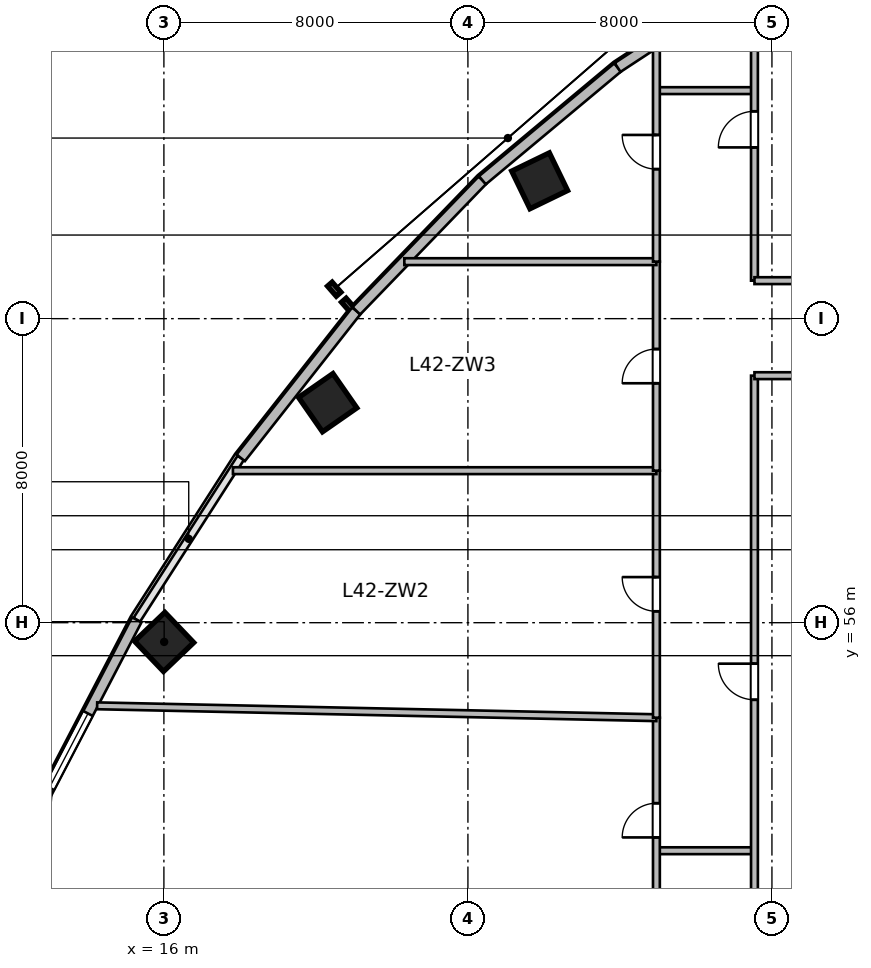
"""IFC4 building model, lengths in metres.
Left out: names, types, materials, properties, quantities, classifications, styles, units other than length and angle.
Written with IfcOpenShell. Run it as: python <this file> out.ifc"""

import sys

from ifc_helpers import new_model, si_unit, direction, frame, frame_2d, origin, origin_2d, place, context, subcontext, project, spatial, rectangle, extrude, source, transform, mapped, element, fill, save


model = new_model("IFC4")
c1 = context("Model", 3, precision=1e-05, world=origin(), true_north=direction((0.0, 1.0)))
c2 = subcontext(c1, "Body", "Model", "MODEL_VIEW")
j1 = project(units=[si_unit("LENGTHUNIT", "METRE"), si_unit("PLANEANGLEUNIT", "RADIAN")], contexts=[c1])
p1 = place(None, origin())
s1 = spatial("IfcSite", under=j1, at=p1, CompositionType="ELEMENT")
p2 = place(p1, origin())
s2 = spatial("IfcBuilding", under=s1, at=p2, CompositionType="ELEMENT")
p3 = place(p2, frame((0.0, 0.0, 174.0)))
s3 = spatial("IfcBuildingStorey", under=s2, at=p3, CompositionType="ELEMENT", Elevation=174.0)
m1 = source(origin(), c2, "Body", "SweptSolid", [
    extrude(rectangle(XDim=1.1, YDim=1.1, at=origin_2d()), origin(), (0.0, 0.0, 1.0), 3.9),
])
for number, where, z_axis, x_axis in (
    (1, (16.007, 55.494, 0.0), (0.0, 0.0, 1.0), (-0.691, 0.723, 0.0)),
    (2, (20.311, 61.789, 0.0), (0.0, 0.0, 1.0), (-0.571, 0.821, 0.0)),
    (3, (25.888, 67.627, 0.0), (0.0, 0.0, 1.0), (-0.436, 0.9, 0.0)),
):
    element("IfcColumn", number, at=place(p3, frame(where, z_axis=z_axis, x_axis=x_axis)), inside=s3, PredefinedType="COLUMN", context=c2, shape_type="MappedRepresentation", body=[
        mapped(m1, transform((0.0, 0.0, 0.0), scale=1.0)),
    ])
m2 = source(origin(), c2, "Body", "SweptSolid", [
    extrude(rectangle(XDim=2.812, YDim=0.28, at=frame_2d((1.406, 0.0))), origin(), (0.0, 0.0, 1.0), 3.65),
])
p4 = place(p3, frame((33.945, 48.973, 0.0), z_axis=(0.0, 0.0, 1.0), x_axis=(-0.694583668785, -0.719411931411, 0.0)))
e4 = element("IfcWall", 4, at=p4, inside=s3, PredefinedType="SOLIDWALL", context=c2, shape_type="MappedRepresentation", body=[
    mapped(m2, transform((0.0, 0.0, 0.0), scale=1.0)),
])
m3 = source(origin(), c2, "Body", "SweptSolid", [
    extrude(rectangle(XDim=5.171, YDim=0.28, at=frame_2d((2.585, 0.0))), origin(), (0.0, 0.0, 1.0), 3.65),
])
p5 = place(p3, frame((12.898, 51.489, 0.0), z_axis=(0.0, 0.0, 1.0), x_axis=(0.461752581363, 0.887008767491, 0.0)))
e5 = element("IfcWall", 5, at=p5, inside=s3, PredefinedType="SOLIDWALL", context=c2, shape_type="MappedRepresentation", body=[
    mapped(m3, transform((0.0, 0.0, 0.0), scale=1.0)),
])
p6 = place(p5, frame((0.193, 0.0, 0.95)))
e6 = element("IfcOpeningElement", 6, at=p6, cuts=e5, PredefinedType="OPENING", context=c2, shape_type="SweptSolid", body=[
    extrude(rectangle(XDim=2.2, YDim=2.1, at=frame_2d((1.1, 1.05))), frame((0.0, 0.15, 0.0), z_axis=(0.0, -1.0, 0.0), x_axis=(1.0, 0.0, 0.0)), (0.0, 0.0, 1.0), 0.3),
])
m4 = source(origin(), c2, "Body", "SweptSolid", [
    extrude(rectangle(XDim=4.922, YDim=0.28, at=frame_2d((2.461, 0.0))), origin(), (0.0, 0.0, 1.0), 3.65),
])
p7 = place(p3, frame((18.021, 60.338, 0.0), z_axis=(0.0, 0.0, 1.0), x_axis=(0.61817639101, 0.786039407153, 0.0)))
e7 = element("IfcWall", 7, at=p7, inside=s3, PredefinedType="SOLIDWALL", context=c2, shape_type="MappedRepresentation", body=[
    mapped(m4, transform((0.0, 0.0, 0.0), scale=1.0)),
])
m5 = source(origin(), c2, "Body", "SweptSolid", [
    extrude(rectangle(XDim=4.776, YDim=0.28, at=frame_2d((2.388, 0.0))), origin(), (0.0, 0.0, 1.0), 3.65),
])
p8 = place(p3, frame((21.064, 64.206, 0.0), z_axis=(0.0, 0.0, 1.0), x_axis=(0.694601811851, 0.719394414055, 0.0)))
e8 = element("IfcWall", 8, at=p8, inside=s3, PredefinedType="SOLIDWALL", context=c2, shape_type="MappedRepresentation", body=[
    mapped(m5, transform((0.0, 0.0, 0.0), scale=1.0)),
])
m6 = source(origin(), c2, "Body", "SweptSolid", [
    extrude(rectangle(XDim=4.634, YDim=0.28, at=frame_2d((2.317, 0.0))), origin(), (0.0, 0.0, 1.0), 3.65),
])
p9 = place(p3, frame((24.381, 67.642, 0.0), z_axis=(0.0, 0.0, 1.0), x_axis=(0.767910229096, 0.640557475993, 0.0)))
e9 = element("IfcWall", 9, at=p9, inside=s3, PredefinedType="SOLIDWALL", context=c2, shape_type="MappedRepresentation", body=[
    mapped(m6, transform((0.0, 0.0, 0.0), scale=1.0)),
])
m7 = source(origin(), c2, "Body", "SweptSolid", [
    extrude(rectangle(XDim=4.501, YDim=0.28, at=frame_2d((2.25, 0.0))), origin(), (0.0, 0.0, 1.0), 3.65),
])
p10 = place(p3, frame((27.939, 70.61, 0.0), z_axis=(0.0, 0.0, 1.0), x_axis=(0.835984920737, 0.548752414391, 0.0)))
e10 = element("IfcWall", 10, at=p10, inside=s3, PredefinedType="SOLIDWALL", context=c2, shape_type="MappedRepresentation", body=[
    mapped(m7, transform((0.0, 0.0, 0.0), scale=1.0)),
])
m8 = source(origin(), c2, "Body", "SweptSolid", [
    extrude(rectangle(XDim=2.5, YDim=0.18, at=frame_2d((1.25, 0.0))), origin(), (0.0, 0.0, 1.0), 3.65),
])
p11 = place(p3, frame((29.0, 50.0, 0.0), z_axis=(0.0, 0.0, 1.0), x_axis=(1.0, 0.0, 0.0)))
e11 = element("IfcWall", 11, at=p11, inside=s3, PredefinedType="PLUMBINGWALL", context=c2, shape_type="MappedRepresentation", body=[
    mapped(m8, transform((0.0, 0.0, 0.0), scale=1.0)),
])
m9 = source(origin(), c2, "Body", "SweptSolid", [
    extrude(rectangle(XDim=2.5, YDim=0.18, at=frame_2d((1.25, 0.0))), origin(), (0.0, 0.0, 1.0), 3.022),
])
p12 = place(p3, frame((29.0, 70.0, 0.0), z_axis=(0.0, 0.0, 1.0), x_axis=(1.0, 0.0, 0.0)))
e12 = element("IfcWall", 12, at=p12, inside=s3, PredefinedType="PLUMBINGWALL", context=c2, shape_type="MappedRepresentation", body=[
    mapped(m9, transform((0.0, 0.0, 0.0), scale=1.0)),
])
m10 = source(origin(), c2, "Body", "SweptSolid", [
    extrude(rectangle(XDim=10.735, YDim=0.18, at=frame_2d((5.368, 0.0))), origin(), (0.0, 0.0, 1.0), 2.942),
])
p13 = place(p3, frame((28.96, 42.765, 0.0), z_axis=(0.0, 0.0, 1.0), x_axis=(0.0, 1.0, 0.0)))
e13 = element("IfcWall", 13, at=p13, inside=s3, PredefinedType="PLUMBINGWALL", context=c2, shape_type="MappedRepresentation", body=[
    mapped(m10, transform((0.0, 0.0, 0.0), scale=1.0)),
])
p14 = place(p13, frame((7.585, 0.0, 0.0)))
e14 = element("IfcOpeningElement", 14, at=p14, cuts=e13, PredefinedType="OPENING", context=c2, shape_type="SweptSolid", body=[
    extrude(rectangle(XDim=0.9, YDim=2.08, at=frame_2d((0.45, 1.04))), frame((0.0, 0.1, 0.0), z_axis=(0.0, -1.0, 0.0), x_axis=(1.0, 0.0, 0.0)), (0.0, 0.0, 1.0), 0.2),
])
m11 = source(origin(), c2, "Body", "SweptSolid", [
    extrude(rectangle(XDim=14.72, YDim=0.18, at=frame_2d((7.36, 0.0))), origin(), (0.0, 0.0, 1.0), 3.65),
])
p15 = place(p3, frame((14.243, 53.813, 0.0), z_axis=(0.0, 0.0, 1.0), x_axis=(0.999773932637, -0.021262258118, 0.0)))
e15 = element("IfcWall", 15, at=p15, inside=s3, PredefinedType="PLUMBINGWALL", context=c2, shape_type="MappedRepresentation", body=[
    mapped(m11, transform((0.0, 0.0, 0.0), scale=1.0)),
])
m12 = source(origin(), c2, "Body", "SweptSolid", [
    extrude(rectangle(XDim=6.5, YDim=0.18, at=frame_2d((3.25, 0.0))), origin(), (0.0, 0.0, 1.0), 3.081),
])
p16 = place(p3, frame((28.96, 53.5, 0.0), z_axis=(0.0, 0.0, 1.0), x_axis=(0.0, 1.0, 0.0)))
e16 = element("IfcWall", 16, at=p16, inside=s3, PredefinedType="PLUMBINGWALL", context=c2, shape_type="MappedRepresentation", body=[
    mapped(m12, transform((0.0, 0.0, 0.0), scale=1.0)),
])
p17 = place(p16, frame((2.8, 0.0, 0.0)))
e17 = element("IfcOpeningElement", 17, at=p17, cuts=e16, PredefinedType="OPENING", context=c2, shape_type="SweptSolid", body=[
    extrude(rectangle(XDim=0.9, YDim=2.08, at=frame_2d((0.45, 1.04))), frame((0.0, 0.1, 0.0), z_axis=(0.0, -1.0, 0.0), x_axis=(1.0, 0.0, 0.0)), (0.0, 0.0, 1.0), 0.2),
])
m13 = source(origin(), c2, "Body", "SweptSolid", [
    extrude(rectangle(XDim=11.144, YDim=0.18, at=frame_2d((5.572, 0.0))), origin(), (0.0, 0.0, 1.0), 3.65),
])
p18 = place(p3, frame((17.816, 60.0, 0.0), z_axis=(0.0, 0.0, 1.0), x_axis=(1.0, 0.0, 0.0)))
e18 = element("IfcWall", 18, at=p18, inside=s3, PredefinedType="PLUMBINGWALL", context=c2, shape_type="MappedRepresentation", body=[
    mapped(m13, transform((0.0, 0.0, 0.0), scale=1.0)),
])
m14 = source(origin(), c2, "Body", "SweptSolid", [
    extrude(rectangle(XDim=5.5, YDim=0.18, at=frame_2d((2.75, 0.0))), origin(), (0.0, 0.0, 1.0), 2.942),
])
p19 = place(p3, frame((28.96, 60.0, 0.0), z_axis=(0.0, 0.0, 1.0), x_axis=(0.0, 1.0, 0.0)))
e19 = element("IfcWall", 19, at=p19, inside=s3, PredefinedType="PLUMBINGWALL", context=c2, shape_type="MappedRepresentation", body=[
    mapped(m14, transform((0.0, 0.0, 0.0), scale=1.0)),
])
p20 = place(p19, frame((2.3, 0.0, 0.0)))
e20 = element("IfcOpeningElement", 20, at=p20, cuts=e19, PredefinedType="OPENING", context=c2, shape_type="SweptSolid", body=[
    extrude(rectangle(XDim=0.9, YDim=2.08, at=frame_2d((0.45, 1.04))), frame((0.0, 0.1, 0.0), z_axis=(0.0, -1.0, 0.0), x_axis=(1.0, 0.0, 0.0)), (0.0, 0.0, 1.0), 0.2),
])
m15 = source(origin(), c2, "Body", "SweptSolid", [
    extrude(rectangle(XDim=6.633, YDim=0.18, at=frame_2d((3.317, 0.0))), origin(), (0.0, 0.0, 1.0), 3.65),
])
p21 = place(p3, frame((22.327, 65.5, 0.0), z_axis=(0.0, 0.0, 1.0), x_axis=(1.0, 0.0, 0.0)))
e21 = element("IfcWall", 21, at=p21, inside=s3, PredefinedType="PLUMBINGWALL", context=c2, shape_type="MappedRepresentation", body=[
    mapped(m15, transform((0.0, 0.0, 0.0), scale=1.0)),
])
m16 = source(origin(), c2, "Body", "SweptSolid", [
    extrude(rectangle(XDim=5.768, YDim=0.18, at=frame_2d((2.884, 0.0))), origin(), (0.0, 0.0, 1.0), 3.65),
])
p22 = place(p3, frame((28.96, 65.5, 0.0), z_axis=(0.0, 0.0, 1.0), x_axis=(0.0, 1.0, 0.0)))
e22 = element("IfcWall", 22, at=p22, inside=s3, PredefinedType="PLUMBINGWALL", context=c2, shape_type="MappedRepresentation", body=[
    mapped(m16, transform((0.0, 0.0, 0.0), scale=1.0)),
])
p23 = place(p22, frame((2.434, 0.0, 0.0)))
e23 = element("IfcOpeningElement", 23, at=p23, cuts=e22, PredefinedType="OPENING", context=c2, shape_type="SweptSolid", body=[
    extrude(rectangle(XDim=0.9, YDim=2.08, at=frame_2d((0.45, 1.04))), frame((0.0, 0.1, 0.0), z_axis=(0.0, -1.0, 0.0), x_axis=(1.0, 0.0, 0.0)), (0.0, 0.0, 1.0), 0.2),
])
m17 = source(origin(), c2, "Body", "SweptSolid", [
    extrude(rectangle(XDim=16.106, YDim=0.18, at=frame_2d((8.053, 0.0))), origin(), (0.0, 0.0, 1.0), 2.942),
])
p24 = place(p3, frame((31.54, 46.394, 0.0), z_axis=(0.0, 0.0, 1.0), x_axis=(0.0, 1.0, 0.0)))
e24 = element("IfcWall", 24, at=p24, inside=s3, PredefinedType="PLUMBINGWALL", context=c2, shape_type="MappedRepresentation", body=[
    mapped(m17, transform((0.0, 0.0, 0.0), scale=1.0)),
])
p25 = place(p24, frame((7.578, 0.0, 0.0)))
e25 = element("IfcOpeningElement", 25, at=p25, cuts=e24, PredefinedType="OPENING", context=c2, shape_type="SweptSolid", body=[
    extrude(rectangle(XDim=0.95, YDim=2.1, at=frame_2d((0.475, 1.05))), frame((0.0, 0.1, 0.0), z_axis=(0.0, -1.0, 0.0), x_axis=(1.0, 0.0, 0.0)), (0.0, 0.0, 1.0), 0.2),
])
m18 = source(origin(), c2, "Body", "SweptSolid", [
    extrude(rectangle(XDim=2.86, YDim=0.18, at=frame_2d((1.43, 0.0))), origin(), (0.0, 0.0, 1.0), 3.65),
])
p26 = place(p3, frame((31.54, 62.5, 0.0), z_axis=(0.0, 0.0, 1.0), x_axis=(1.0, 0.0, 0.0)))
e26 = element("IfcWall", 26, at=p26, inside=s3, PredefinedType="PLUMBINGWALL", context=c2, shape_type="MappedRepresentation", body=[
    mapped(m18, transform((0.0, 0.0, 0.0), scale=1.0)),
])
m19 = source(origin(), c2, "Body", "SweptSolid", [
    extrude(rectangle(XDim=7.962, YDim=0.18, at=frame_2d((3.981, 0.0))), origin(), (0.0, 0.0, 1.0), 3.65),
])
p27 = place(p3, frame((31.54, 65.0, 0.0), z_axis=(0.0, 0.0, 1.0), x_axis=(0.0, 1.0, 0.0)))
e27 = element("IfcWall", 27, at=p27, inside=s3, PredefinedType="PLUMBINGWALL", context=c2, shape_type="MappedRepresentation", body=[
    mapped(m19, transform((0.0, 0.0, 0.0), scale=1.0)),
])
p28 = place(p27, frame((3.506, 0.0, 0.0)))
e28 = element("IfcOpeningElement", 28, at=p28, cuts=e27, PredefinedType="OPENING", context=c2, shape_type="SweptSolid", body=[
    extrude(rectangle(XDim=0.95, YDim=2.1, at=frame_2d((0.475, 1.05))), frame((0.0, 0.1, 0.0), z_axis=(0.0, -1.0, 0.0), x_axis=(1.0, 0.0, 0.0)), (0.0, 0.0, 1.0), 0.2),
])
p29 = place(p3, frame((31.54, 65.0, 0.0), z_axis=(0.0, 0.0, 1.0), x_axis=(1.0, 0.0, 0.0)))
e29 = element("IfcWall", 29, at=p29, inside=s3, PredefinedType="PLUMBINGWALL", context=c2, shape_type="MappedRepresentation", body=[
    mapped(m18, transform((0.0, 0.0, 0.0), scale=1.0)),
])
m20 = source(origin(), c2, "Body", "SweptSolid", [
    extrude(rectangle(XDim=2.2, YDim=2.1, at=frame_2d((1.1, 1.05))), frame((0.0, 0.03, 0.0), z_axis=(0.0, -1.0, 0.0), x_axis=(1.0, 0.0, 0.0)), (0.0, 0.0, 1.0), 0.06),
])
p30 = place(p6, origin())
e30 = element("IfcWindow", 30, at=p30, inside=s3, PartitioningType="TRIPLE_PANEL_VERTICAL", PredefinedType="WINDOW", context=c2, shape_type="MappedRepresentation", body=[
    mapped(m20, transform((0.0, 0.0, 0.0), scale=1.0)),
])
fill(e6, e30)
m21 = source(origin(), c2, "Body", "SweptSolid", [
    extrude(rectangle(XDim=0.9, YDim=2.08, at=frame_2d((0.45, 1.04))), frame((0.0, 0.025, 0.0), z_axis=(0.0, -1.0, 0.0), x_axis=(1.0, 0.0, 0.0)), (0.0, 0.0, 1.0), 0.05),
])
p31 = place(p14, origin())
e31 = element("IfcDoor", 31, at=p31, inside=s3, OperationType="SINGLE_SWING_LEFT", PredefinedType="DOOR", context=c2, shape_type="MappedRepresentation", body=[
    mapped(m21, transform((0.0, 0.0, 0.0), scale=1.0)),
])
fill(e14, e31)
p32 = place(p17, origin())
e32 = element("IfcDoor", 32, at=p32, inside=s3, OperationType="SINGLE_SWING_RIGHT", PredefinedType="DOOR", context=c2, shape_type="MappedRepresentation", body=[
    mapped(m21, transform((0.0, 0.0, 0.0), scale=1.0)),
])
fill(e17, e32)
p33 = place(p20, origin())
e33 = element("IfcDoor", 33, at=p33, inside=s3, OperationType="SINGLE_SWING_LEFT", PredefinedType="DOOR", context=c2, shape_type="MappedRepresentation", body=[
    mapped(m21, transform((0.0, 0.0, 0.0), scale=1.0)),
])
fill(e20, e33)
p34 = place(p23, origin())
e34 = element("IfcDoor", 34, at=p34, inside=s3, OperationType="SINGLE_SWING_RIGHT", PredefinedType="DOOR", context=c2, shape_type="MappedRepresentation", body=[
    mapped(m21, transform((0.0, 0.0, 0.0), scale=1.0)),
])
fill(e23, e34)
m22 = source(origin(), c2, "Body", "SweptSolid", [
    extrude(rectangle(XDim=0.95, YDim=2.1, at=frame_2d((0.475, 1.05))), frame((0.0, 0.025, 0.0), z_axis=(0.0, -1.0, 0.0), x_axis=(1.0, 0.0, 0.0)), (0.0, 0.0, 1.0), 0.05),
])
p35 = place(p25, origin())
e35 = element("IfcDoor", 35, at=p35, inside=s3, OperationType="SINGLE_SWING_RIGHT", PredefinedType="DOOR", context=c2, shape_type="MappedRepresentation", body=[
    mapped(m22, transform((0.0, 0.0, 0.0), scale=1.0)),
])
fill(e25, e35)
p36 = place(p28, origin())
e36 = element("IfcDoor", 36, at=p36, inside=s3, OperationType="SINGLE_SWING_LEFT", PredefinedType="DOOR", context=c2, shape_type="MappedRepresentation", body=[
    mapped(m22, transform((0.0, 0.0, 0.0), scale=1.0)),
])
fill(e28, e36)
save(model, sys.argv[1])
